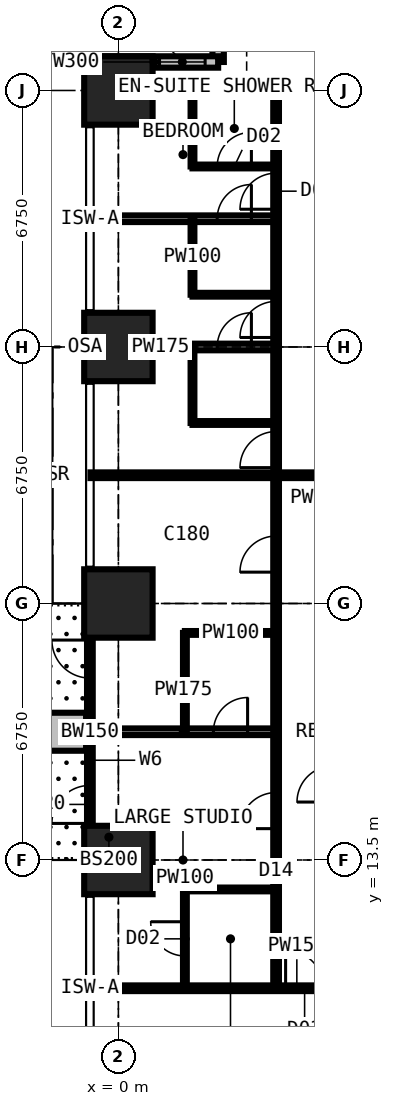
"""IFC4 building model, lengths in metres.
Left out: names, types, materials, properties, quantities, classifications, styles, units other than length and angle.
Written with IfcOpenShell. Run it as: python <this file> out.ifc"""

import sys

from ifc_helpers import new_model, si_unit, direction, frame, frame_2d, origin, origin_2d, place, context, subcontext, project, spatial, rectangle, extrude, element, fill, save


model = new_model("IFC4")
c1 = context("Model", 3, precision=1e-05, world=origin(), true_north=direction((0.0, 1.0)))
c2 = subcontext(c1, "Body", "Model", "MODEL_VIEW")
j1 = project(units=[si_unit("LENGTHUNIT", "METRE"), si_unit("PLANEANGLEUNIT", "RADIAN")], contexts=[c1])
p1 = place(None, origin())
s1 = spatial("IfcSite", under=j1, at=p1, CompositionType="ELEMENT")
p2 = place(p1, origin())
s2 = spatial("IfcBuilding", under=s1, at=p2, CompositionType="ELEMENT")
p3 = place(p2, frame((0.0, 0.0, 68.4)))
s3 = spatial("IfcBuildingStorey", under=s2, at=p3, CompositionType="ELEMENT", Elevation=68.4)
for number, where, z_axis, x_axis in (
    (1, (0.0, 13.5, 0.0), (0.0, 0.0, 1.0), (1.0, 0.0, 0.0)),
    (2, (0.0, 20.25, 0.0), (0.0, 0.0, 1.0), (1.0, 0.0, 0.0)),
    (3, (0.0, 27.0, 0.0), (0.0, 0.0, 1.0), (1.0, 0.0, 0.0)),
    (4, (0.0, 33.75, 0.0), (0.0, 0.0, 1.0), (1.0, 0.0, 0.0)),
):
    element("IfcColumn", number, at=place(p3, frame(where, z_axis=z_axis, x_axis=x_axis)), inside=s3, PredefinedType="COLUMN", context=c2, shape_type="SweptSolid", body=[
        extrude(rectangle(XDim=1.8, YDim=1.8, at=origin_2d()), origin(), (0.0, 0.0, 1.0), 3.6),
    ])
p4 = place(p3, frame((2.625, 37.875, 0.0), z_axis=(0.0, 0.0, 1.0), x_axis=(0.0, -1.0, 0.0)))
e5 = element("IfcWall", 5, at=p4, inside=s3, PredefinedType="SOLIDWALL", context=c2, shape_type="SweptSolid", body=[
    extrude(rectangle(XDim=3.375, YDim=0.3, at=frame_2d((1.688, 0.0))), origin(), (0.0, 0.0, 1.0), 3.375),
])
p5 = place(p4, frame((0.788, 0.0, 0.6)))
e6 = element("IfcOpeningElement", 6, at=p5, cuts=e5, PredefinedType="OPENING", context=c2, shape_type="SweptSolid", body=[
    extrude(rectangle(XDim=1.8, YDim=2.1, at=frame_2d((0.9, 1.05))), frame((0.0, 0.16, 0.0), z_axis=(0.0, -1.0, 0.0), x_axis=(1.0, 0.0, 0.0)), (0.0, 0.0, 1.0), 0.32),
])
p6 = place(p3, frame((2.625, 34.5, 0.0), z_axis=(0.0, 0.0, 1.0), x_axis=(-1.0, 0.0, 0.0)))
e7 = element("IfcWall", 7, at=p6, inside=s3, PredefinedType="SOLIDWALL", context=c2, shape_type="SweptSolid", body=[
    extrude(rectangle(XDim=3.375, YDim=0.3, at=frame_2d((1.688, 0.0))), origin(), (0.0, 0.0, 1.0), 3.375),
])
p7 = place(p6, frame((0.343, 0.0, 0.9)))
e8 = element("IfcOpeningElement", 8, at=p7, cuts=e7, PredefinedType="OPENING", context=c2, shape_type="SweptSolid", body=[
    extrude(rectangle(XDim=1.2, YDim=1.8, at=frame_2d((0.6, 0.9))), frame((0.0, 0.16, 0.0), z_axis=(0.0, -1.0, 0.0), x_axis=(1.0, 0.0, 0.0)), (0.0, 0.0, 1.0), 0.32),
])
p8 = place(p3, frame((-0.75, 13.5, 0.0), z_axis=(0.0, 0.0, 1.0), x_axis=(0.0, 1.0, 0.0)))
e9 = element("IfcWall", 9, at=p8, inside=s3, PredefinedType="SOLIDWALL", context=c2, shape_type="SweptSolid", body=[
    extrude(rectangle(XDim=6.75, YDim=0.15, at=frame_2d((3.375, 0.0))), origin(), (0.0, 0.0, 1.0), 3.375),
])
p9 = place(p8, frame((0.962, 0.0, 0.0)))
e10 = element("IfcOpeningElement", 10, at=p9, cuts=e9, PredefinedType="OPENING", context=c2, shape_type="SweptSolid", body=[
    extrude(rectangle(XDim=1.0, YDim=2.2, at=frame_2d((0.5, 1.1))), frame((0.0, 0.085, 0.0), z_axis=(0.0, -1.0, 0.0), x_axis=(1.0, 0.0, 0.0)), (0.0, 0.0, 1.0), 0.17),
])
p10 = place(p8, frame((2.025, 0.0, 0.9)))
e11 = element("IfcOpeningElement", 11, at=p10, cuts=e9, PredefinedType="OPENING", context=c2, shape_type="SweptSolid", body=[
    extrude(rectangle(XDim=1.2, YDim=1.8, at=frame_2d((0.6, 0.9))), frame((0.0, 0.085, 0.0), z_axis=(0.0, -1.0, 0.0), x_axis=(1.0, 0.0, 0.0)), (0.0, 0.0, 1.0), 0.17),
])
p11 = place(p8, frame((4.788, 0.0, 0.0)))
e12 = element("IfcOpeningElement", 12, at=p11, cuts=e9, PredefinedType="OPENING", context=c2, shape_type="SweptSolid", body=[
    extrude(rectangle(XDim=1.0, YDim=2.2, at=frame_2d((0.5, 1.1))), frame((0.0, 0.085, 0.0), z_axis=(0.0, -1.0, 0.0), x_axis=(1.0, 0.0, 0.0)), (0.0, 0.0, 1.0), 0.17),
])
p12 = place(p8, frame((3.525, 0.0, 0.9)))
e13 = element("IfcOpeningElement", 13, at=p12, cuts=e9, PredefinedType="OPENING", context=c2, shape_type="SweptSolid", body=[
    extrude(rectangle(XDim=1.2, YDim=1.8, at=frame_2d((0.6, 0.9))), frame((0.0, 0.085, 0.0), z_axis=(0.0, -1.0, 0.0), x_axis=(1.0, 0.0, 0.0)), (0.0, 0.0, 1.0), 0.17),
])
p13 = place(p3, frame((-0.85, 16.875, 0.0), z_axis=(0.0, 0.0, 1.0), x_axis=(-1.0, 0.0, 0.0)))
e14 = element("IfcWall", 14, at=p13, inside=s3, PredefinedType="USERDEFINED", context=c2, shape_type="SweptSolid", body=[
    extrude(rectangle(XDim=2.2, YDim=1.0, at=frame_2d((1.1, 0.0))), origin(), (0.0, 0.0, 1.0), 0.9),
])
p14 = place(p3, frame((-0.734, 10.125, 0.0), z_axis=(0.0, 0.0, 1.0), x_axis=(1.0, 0.0, 0.0)))
e15 = element("IfcWall", 15, at=p14, inside=s3, PredefinedType="PARTITIONING", context=c2, shape_type="SweptSolid", body=[
    extrude(rectangle(XDim=10.859, YDim=0.15, at=frame_2d((5.429, 0.0))), origin(), (0.0, 0.0, 1.0), 3.375),
])
p15 = place(p14, frame((5.134, 0.0, 0.0)))
e16 = element("IfcOpeningElement", 16, at=p15, cuts=e15, PredefinedType="OPENING", context=c2, shape_type="SweptSolid", body=[
    extrude(rectangle(XDim=1.0, YDim=2.2, at=frame_2d((0.5, 1.1))), frame((0.0, 0.085, 0.0), z_axis=(0.0, -1.0, 0.0), x_axis=(1.0, 0.0, 0.0)), (0.0, 0.0, 1.0), 0.17),
])
p16 = place(p3, frame((-0.734, 16.875, 0.0), z_axis=(0.0, 0.0, 1.0), x_axis=(1.0, 0.0, 0.0)))
e17 = element("IfcWall", 17, at=p16, inside=s3, PredefinedType="PARTITIONING", context=c2, shape_type="SweptSolid", body=[
    extrude(rectangle(XDim=4.884, YDim=0.175, at=frame_2d((2.442, 0.0))), origin(), (0.0, 0.0, 1.0), 3.375),
])
p17 = place(p16, frame((3.234, 0.0, 0.0)))
e18 = element("IfcOpeningElement", 18, at=p17, cuts=e17, PredefinedType="OPENING", context=c2, shape_type="SweptSolid", body=[
    extrude(rectangle(XDim=0.9, YDim=2.2, at=frame_2d((0.45, 1.1))), frame((0.0, 0.097, 0.0), z_axis=(0.0, -1.0, 0.0), x_axis=(1.0, 0.0, 0.0)), (0.0, 0.0, 1.0), 0.195),
])
p18 = place(p3, frame((-0.734, 23.625, 0.0), z_axis=(0.0, 0.0, 1.0), x_axis=(1.0, 0.0, 0.0)))
e19 = element("IfcWall", 19, at=p18, inside=s3, PredefinedType="PARTITIONING", context=c2, shape_type="SweptSolid", body=[
    extrude(rectangle(XDim=12.034, YDim=0.15, at=frame_2d((6.017, 0.0))), origin(), (0.0, 0.0, 1.0), 3.375),
])
p19 = place(p3, frame((-0.734, 27.0, 0.0), z_axis=(0.0, 0.0, 1.0), x_axis=(1.0, 0.0, 0.0)))
e20 = element("IfcWall", 20, at=p19, inside=s3, PredefinedType="PARTITIONING", context=c2, shape_type="SweptSolid", body=[
    extrude(rectangle(XDim=4.884, YDim=0.175, at=frame_2d((2.442, 0.0))), origin(), (0.0, 0.0, 1.0), 2.61),
])
p20 = place(p19, frame((3.334, 0.0, 0.0)))
e21 = element("IfcOpeningElement", 21, at=p20, cuts=e20, PredefinedType="OPENING", context=c2, shape_type="SweptSolid", body=[
    extrude(rectangle(XDim=0.9, YDim=2.2, at=frame_2d((0.45, 1.1))), frame((0.0, 0.097, 0.0), z_axis=(0.0, -1.0, 0.0), x_axis=(1.0, 0.0, 0.0)), (0.0, 0.0, 1.0), 0.195),
])
p21 = place(p3, frame((-0.734, 30.375, 0.0), z_axis=(0.0, 0.0, 1.0), x_axis=(1.0, 0.0, 0.0)))
e22 = element("IfcWall", 22, at=p21, inside=s3, PredefinedType="PARTITIONING", context=c2, shape_type="SweptSolid", body=[
    extrude(rectangle(XDim=4.884, YDim=0.175, at=frame_2d((2.442, 0.0))), origin(), (0.0, 0.0, 1.0), 3.375),
])
p22 = place(p21, frame((3.334, 0.0, 0.0)))
e23 = element("IfcOpeningElement", 23, at=p22, cuts=e22, PredefinedType="OPENING", context=c2, shape_type="SweptSolid", body=[
    extrude(rectangle(XDim=0.9, YDim=2.2, at=frame_2d((0.45, 1.1))), frame((0.0, 0.097, 0.0), z_axis=(0.0, -1.0, 0.0), x_axis=(1.0, 0.0, 0.0)), (0.0, 0.0, 1.0), 0.195),
])
p23 = place(p3, frame((-0.734, 33.75, 0.0), z_axis=(0.0, 0.0, 1.0), x_axis=(1.0, 0.0, 0.0)))
e24 = element("IfcWall", 24, at=p23, inside=s3, PredefinedType="PARTITIONING", context=c2, shape_type="SweptSolid", body=[
    extrude(rectangle(XDim=10.859, YDim=0.15, at=frame_2d((5.429, 0.0))), origin(), (0.0, 0.0, 1.0), 2.877),
])
p24 = place(p23, frame((8.434, 0.0, 0.0)))
e25 = element("IfcOpeningElement", 25, at=p24, cuts=e24, PredefinedType="OPENING", context=c2, shape_type="SweptSolid", body=[
    extrude(rectangle(XDim=1.0, YDim=2.2, at=frame_2d((0.5, 1.1))), frame((0.0, 0.085, 0.0), z_axis=(0.0, -1.0, 0.0), x_axis=(1.0, 0.0, 0.0)), (0.0, 0.0, 1.0), 0.17),
])
p25 = place(p3, frame((1.75, 10.125, 0.0), z_axis=(0.0, 0.0, 1.0), x_axis=(0.0, 1.0, 0.0)))
e26 = element("IfcWall", 26, at=p25, inside=s3, PredefinedType="PARTITIONING", context=c2, shape_type="SweptSolid", body=[
    extrude(rectangle(XDim=2.6, YDim=0.1, at=frame_2d((1.3, 0.0))), origin(), (0.0, 0.0, 1.0), 3.375),
])
p26 = place(p25, frame((0.85, 0.0, 0.0)))
e27 = element("IfcOpeningElement", 27, at=p26, cuts=e26, PredefinedType="OPENING", context=c2, shape_type="SweptSolid", body=[
    extrude(rectangle(XDim=0.9, YDim=2.2, at=frame_2d((0.45, 1.1))), frame((0.0, 0.06, 0.0), z_axis=(0.0, -1.0, 0.0), x_axis=(1.0, 0.0, 0.0)), (0.0, 0.0, 1.0), 0.12),
])
p27 = place(p3, frame((1.75, 12.725, 0.0), z_axis=(0.0, 0.0, 1.0), x_axis=(1.0, 0.0, 0.0)))
e28 = element("IfcWall", 28, at=p27, inside=s3, PredefinedType="PARTITIONING", context=c2, shape_type="SweptSolid", body=[
    extrude(rectangle(XDim=2.4, YDim=0.1, at=frame_2d((1.2, 0.0))), origin(), (0.0, 0.0, 1.0), 3.375),
])
p28 = place(p3, frame((1.75, 16.875, 0.0), z_axis=(0.0, 0.0, 1.0), x_axis=(0.0, 1.0, 0.0)))
e29 = element("IfcWall", 29, at=p28, inside=s3, PredefinedType="PARTITIONING", context=c2, shape_type="SweptSolid", body=[
    extrude(rectangle(XDim=2.6, YDim=0.1, at=frame_2d((1.3, 0.0))), origin(), (0.0, 0.0, 1.0), 3.375),
])
p29 = place(p3, frame((1.75, 19.475, 0.0), z_axis=(0.0, 0.0, 1.0), x_axis=(1.0, 0.0, 0.0)))
e30 = element("IfcWall", 30, at=p29, inside=s3, PredefinedType="PARTITIONING", context=c2, shape_type="SweptSolid", body=[
    extrude(rectangle(XDim=2.4, YDim=0.1, at=frame_2d((1.2, 0.0))), origin(), (0.0, 0.0, 1.0), 3.375),
])
p30 = place(p3, frame((1.95, 25.0, 0.0), z_axis=(0.0, 0.0, 1.0), x_axis=(0.0, 1.0, 0.0)))
e31 = element("IfcWall", 31, at=p30, inside=s3, PredefinedType="PARTITIONING", context=c2, shape_type="SweptSolid", body=[
    extrude(rectangle(XDim=2.0, YDim=0.1, at=frame_2d((1.0, 0.0))), origin(), (0.0, 0.0, 1.0), 3.375),
])
p31 = place(p3, frame((1.95, 25.0, 0.0), z_axis=(0.0, 0.0, 1.0), x_axis=(1.0, 0.0, 0.0)))
e32 = element("IfcWall", 32, at=p31, inside=s3, PredefinedType="PARTITIONING", context=c2, shape_type="SweptSolid", body=[
    extrude(rectangle(XDim=2.2, YDim=0.1, at=frame_2d((1.1, 0.0))), origin(), (0.0, 0.0, 1.0), 3.375),
])
p32 = place(p3, frame((1.95, 28.375, 0.0), z_axis=(0.0, 0.0, 1.0), x_axis=(0.0, 1.0, 0.0)))
e33 = element("IfcWall", 33, at=p32, inside=s3, PredefinedType="PARTITIONING", context=c2, shape_type="SweptSolid", body=[
    extrude(rectangle(XDim=2.0, YDim=0.1, at=frame_2d((1.0, 0.0))), origin(), (0.0, 0.0, 1.0), 3.375),
])
p33 = place(p3, frame((1.95, 28.375, 0.0), z_axis=(0.0, 0.0, 1.0), x_axis=(1.0, 0.0, 0.0)))
e34 = element("IfcWall", 34, at=p33, inside=s3, PredefinedType="PARTITIONING", context=c2, shape_type="SweptSolid", body=[
    extrude(rectangle(XDim=2.2, YDim=0.1, at=frame_2d((1.1, 0.0))), origin(), (0.0, 0.0, 1.0), 3.375),
])
p34 = place(p3, frame((1.95, 31.75, 0.0), z_axis=(0.0, 0.0, 1.0), x_axis=(0.0, 1.0, 0.0)))
e35 = element("IfcWall", 35, at=p34, inside=s3, PredefinedType="PARTITIONING", context=c2, shape_type="SweptSolid", body=[
    extrude(rectangle(XDim=2.0, YDim=0.1, at=frame_2d((1.0, 0.0))), origin(), (0.0, 0.0, 1.0), 3.375),
])
p35 = place(p3, frame((1.95, 31.75, 0.0), z_axis=(0.0, 0.0, 1.0), x_axis=(1.0, 0.0, 0.0)))
e36 = element("IfcWall", 36, at=p35, inside=s3, PredefinedType="PARTITIONING", context=c2, shape_type="SweptSolid", body=[
    extrude(rectangle(XDim=2.2, YDim=0.1, at=frame_2d((1.1, 0.0))), origin(), (0.0, 0.0, 1.0), 3.375),
])
p36 = place(p35, frame((0.65, 0.0, 0.0)))
e37 = element("IfcOpeningElement", 37, at=p36, cuts=e36, PredefinedType="OPENING", context=c2, shape_type="SweptSolid", body=[
    extrude(rectangle(XDim=0.9, YDim=2.2, at=frame_2d((0.45, 1.1))), frame((0.0, 0.06, 0.0), z_axis=(0.0, -1.0, 0.0), x_axis=(1.0, 0.0, 0.0)), (0.0, 0.0, 1.0), 0.12),
])
p37 = place(p3, frame((4.15, 10.125, 0.0), z_axis=(0.0, 0.0, 1.0), x_axis=(0.0, 1.0, 0.0)))
e38 = element("IfcWall", 38, at=p37, inside=s3, PredefinedType="PARTITIONING", context=c2, shape_type="SweptSolid", body=[
    extrude(rectangle(XDim=23.625, YDim=0.15, at=frame_2d((11.812, 0.0))), origin(), (0.0, 0.0, 1.0), 3.375),
])
p38 = place(p37, frame((20.5, 0.0, 0.0)))
e39 = element("IfcOpeningElement", 39, at=p38, cuts=e38, PredefinedType="OPENING", context=c2, shape_type="SweptSolid", body=[
    extrude(rectangle(XDim=0.95, YDim=2.2, at=frame_2d((0.475, 1.1))), frame((0.0, 0.085, 0.0), z_axis=(0.0, -1.0, 0.0), x_axis=(1.0, 0.0, 0.0)), (0.0, 0.0, 1.0), 0.17),
])
p39 = place(p37, frame((17.125, 0.0, 0.0)))
e40 = element("IfcOpeningElement", 40, at=p39, cuts=e38, PredefinedType="OPENING", context=c2, shape_type="SweptSolid", body=[
    extrude(rectangle(XDim=0.95, YDim=2.2, at=frame_2d((0.475, 1.1))), frame((0.0, 0.085, 0.0), z_axis=(0.0, -1.0, 0.0), x_axis=(1.0, 0.0, 0.0)), (0.0, 0.0, 1.0), 0.17),
])
p40 = place(p37, frame((13.7, 0.0, 0.0)))
e41 = element("IfcOpeningElement", 41, at=p40, cuts=e38, PredefinedType="OPENING", context=c2, shape_type="SweptSolid", body=[
    extrude(rectangle(XDim=0.95, YDim=2.2, at=frame_2d((0.475, 1.1))), frame((0.0, 0.085, 0.0), z_axis=(0.0, -1.0, 0.0), x_axis=(1.0, 0.0, 0.0)), (0.0, 0.0, 1.0), 0.17),
])
p41 = place(p37, frame((4.2, 0.0, 0.0)))
e42 = element("IfcOpeningElement", 42, at=p41, cuts=e38, PredefinedType="OPENING", context=c2, shape_type="SweptSolid", body=[
    extrude(rectangle(XDim=0.95, YDim=2.2, at=frame_2d((0.475, 1.1))), frame((0.0, 0.085, 0.0), z_axis=(0.0, -1.0, 0.0), x_axis=(1.0, 0.0, 0.0)), (0.0, 0.0, 1.0), 0.17),
])
p42 = place(p37, frame((10.95, 0.0, 0.0)))
e43 = element("IfcOpeningElement", 43, at=p42, cuts=e38, PredefinedType="OPENING", context=c2, shape_type="SweptSolid", body=[
    extrude(rectangle(XDim=0.95, YDim=2.2, at=frame_2d((0.475, 1.1))), frame((0.0, 0.085, 0.0), z_axis=(0.0, -1.0, 0.0), x_axis=(1.0, 0.0, 0.0)), (0.0, 0.0, 1.0), 0.17),
])
p43 = place(p7, origin())
e44 = element("IfcWindow", 44, at=p43, inside=s3, PartitioningType="SINGLE_PANEL", PredefinedType="WINDOW", context=c2, shape_type="SweptSolid", body=[
    extrude(rectangle(XDim=1.2, YDim=1.8, at=frame_2d((0.6, 0.9))), frame((0.0, 0.03, 0.0), z_axis=(0.0, -1.0, 0.0), x_axis=(1.0, 0.0, 0.0)), (0.0, 0.0, 1.0), 0.06),
])
fill(e8, e44)
p44 = place(p9, origin())
e45 = element("IfcDoor", 45, at=p44, inside=s3, OperationType="SINGLE_SWING_LEFT", PredefinedType="DOOR", context=c2, shape_type="SweptSolid", body=[
    extrude(rectangle(XDim=1.0, YDim=2.2, at=frame_2d((0.5, 1.1))), frame((0.0, 0.025, 0.0), z_axis=(0.0, -1.0, 0.0), x_axis=(1.0, 0.0, 0.0)), (0.0, 0.0, 1.0), 0.05),
])
fill(e10, e45)
p45 = place(p10, origin())
e46 = element("IfcWindow", 46, at=p45, inside=s3, PartitioningType="SINGLE_PANEL", PredefinedType="WINDOW", context=c2, shape_type="SweptSolid", body=[
    extrude(rectangle(XDim=1.2, YDim=1.8, at=frame_2d((0.6, 0.9))), frame((0.0, 0.03, 0.0), z_axis=(0.0, -1.0, 0.0), x_axis=(1.0, 0.0, 0.0)), (0.0, 0.0, 1.0), 0.06),
])
fill(e11, e46)
p46 = place(p11, origin())
e47 = element("IfcDoor", 47, at=p46, inside=s3, OperationType="SINGLE_SWING_RIGHT", PredefinedType="DOOR", context=c2, shape_type="SweptSolid", body=[
    extrude(rectangle(XDim=1.0, YDim=2.2, at=frame_2d((0.5, 1.1))), frame((0.0, 0.025, 0.0), z_axis=(0.0, -1.0, 0.0), x_axis=(1.0, 0.0, 0.0)), (0.0, 0.0, 1.0), 0.05),
])
fill(e12, e47)
p47 = place(p12, origin())
e48 = element("IfcWindow", 48, at=p47, inside=s3, PartitioningType="SINGLE_PANEL", PredefinedType="WINDOW", context=c2, shape_type="SweptSolid", body=[
    extrude(rectangle(XDim=1.2, YDim=1.8, at=frame_2d((0.6, 0.9))), frame((0.0, 0.03, 0.0), z_axis=(0.0, -1.0, 0.0), x_axis=(1.0, 0.0, 0.0)), (0.0, 0.0, 1.0), 0.06),
])
fill(e13, e48)
p48 = place(p15, origin())
e49 = element("IfcDoor", 49, at=p48, inside=s3, OperationType="SINGLE_SWING_LEFT", PredefinedType="DOOR", context=c2, shape_type="SweptSolid", body=[
    extrude(rectangle(XDim=1.0, YDim=2.2, at=frame_2d((0.5, 1.1))), frame((0.0, 0.025, 0.0), z_axis=(0.0, -1.0, 0.0), x_axis=(1.0, 0.0, 0.0)), (0.0, 0.0, 1.0), 0.05),
])
fill(e16, e49)
p49 = place(p38, origin())
e50 = element("IfcDoor", 50, at=p49, inside=s3, OperationType="SINGLE_SWING_LEFT", PredefinedType="DOOR", context=c2, shape_type="SweptSolid", body=[
    extrude(rectangle(XDim=0.95, YDim=2.2, at=frame_2d((0.475, 1.1))), frame((0.0, 0.025, 0.0), z_axis=(0.0, -1.0, 0.0), x_axis=(1.0, 0.0, 0.0)), (0.0, 0.0, 1.0), 0.05),
])
fill(e39, e50)
p50 = place(p36, origin())
e51 = element("IfcDoor", 51, at=p50, inside=s3, OperationType="SINGLE_SWING_RIGHT", PredefinedType="DOOR", context=c2, shape_type="SweptSolid", body=[
    extrude(rectangle(XDim=0.9, YDim=2.2, at=frame_2d((0.45, 1.1))), frame((0.0, 0.025, 0.0), z_axis=(0.0, -1.0, 0.0), x_axis=(1.0, 0.0, 0.0)), (0.0, 0.0, 1.0), 0.05),
])
fill(e37, e51)
p51 = place(p39, origin())
e52 = element("IfcDoor", 52, at=p51, inside=s3, OperationType="SINGLE_SWING_LEFT", PredefinedType="DOOR", context=c2, shape_type="SweptSolid", body=[
    extrude(rectangle(XDim=0.95, YDim=2.2, at=frame_2d((0.475, 1.1))), frame((0.0, 0.025, 0.0), z_axis=(0.0, -1.0, 0.0), x_axis=(1.0, 0.0, 0.0)), (0.0, 0.0, 1.0), 0.05),
])
fill(e40, e52)
p52 = place(p22, origin())
e53 = element("IfcDoor", 53, at=p52, inside=s3, OperationType="SINGLE_SWING_RIGHT", PredefinedType="DOOR", context=c2, shape_type="SweptSolid", body=[
    extrude(rectangle(XDim=0.9, YDim=2.2, at=frame_2d((0.45, 1.1))), frame((0.0, 0.025, 0.0), z_axis=(0.0, -1.0, 0.0), x_axis=(1.0, 0.0, 0.0)), (0.0, 0.0, 1.0), 0.05),
])
fill(e23, e53)
p53 = place(p40, origin())
e54 = element("IfcDoor", 54, at=p53, inside=s3, OperationType="SINGLE_SWING_LEFT", PredefinedType="DOOR", context=c2, shape_type="SweptSolid", body=[
    extrude(rectangle(XDim=0.95, YDim=2.2, at=frame_2d((0.475, 1.1))), frame((0.0, 0.025, 0.0), z_axis=(0.0, -1.0, 0.0), x_axis=(1.0, 0.0, 0.0)), (0.0, 0.0, 1.0), 0.05),
])
fill(e41, e54)
p54 = place(p20, origin())
e55 = element("IfcDoor", 55, at=p54, inside=s3, OperationType="SINGLE_SWING_RIGHT", PredefinedType="DOOR", context=c2, shape_type="SweptSolid", body=[
    extrude(rectangle(XDim=0.9, YDim=2.2, at=frame_2d((0.45, 1.1))), frame((0.0, 0.025, 0.0), z_axis=(0.0, -1.0, 0.0), x_axis=(1.0, 0.0, 0.0)), (0.0, 0.0, 1.0), 0.05),
])
fill(e21, e55)
p55 = place(p41, origin())
e56 = element("IfcDoor", 56, at=p55, inside=s3, OperationType="SINGLE_SWING_LEFT", PredefinedType="DOOR", context=c2, shape_type="SweptSolid", body=[
    extrude(rectangle(XDim=0.95, YDim=2.2, at=frame_2d((0.475, 1.1))), frame((0.0, 0.025, 0.0), z_axis=(0.0, -1.0, 0.0), x_axis=(1.0, 0.0, 0.0)), (0.0, 0.0, 1.0), 0.05),
])
fill(e42, e56)
p56 = place(p26, origin())
e57 = element("IfcDoor", 57, at=p56, inside=s3, OperationType="SINGLE_SWING_RIGHT", PredefinedType="DOOR", context=c2, shape_type="SweptSolid", body=[
    extrude(rectangle(XDim=0.9, YDim=2.2, at=frame_2d((0.45, 1.1))), frame((0.0, 0.025, 0.0), z_axis=(0.0, -1.0, 0.0), x_axis=(1.0, 0.0, 0.0)), (0.0, 0.0, 1.0), 0.05),
])
fill(e27, e57)
p57 = place(p42, origin())
e58 = element("IfcDoor", 58, at=p57, inside=s3, OperationType="SINGLE_SWING_LEFT", PredefinedType="DOOR", context=c2, shape_type="SweptSolid", body=[
    extrude(rectangle(XDim=0.95, YDim=2.2, at=frame_2d((0.475, 1.1))), frame((0.0, 0.025, 0.0), z_axis=(0.0, -1.0, 0.0), x_axis=(1.0, 0.0, 0.0)), (0.0, 0.0, 1.0), 0.05),
])
fill(e43, e58)
p58 = place(p17, origin())
e59 = element("IfcDoor", 59, at=p58, inside=s3, OperationType="SINGLE_SWING_RIGHT", PredefinedType="DOOR", context=c2, shape_type="SweptSolid", body=[
    extrude(rectangle(XDim=0.9, YDim=2.2, at=frame_2d((0.45, 1.1))), frame((0.0, 0.025, 0.0), z_axis=(0.0, -1.0, 0.0), x_axis=(1.0, 0.0, 0.0)), (0.0, 0.0, 1.0), 0.05),
])
fill(e18, e59)
save(model, sys.argv[1])
